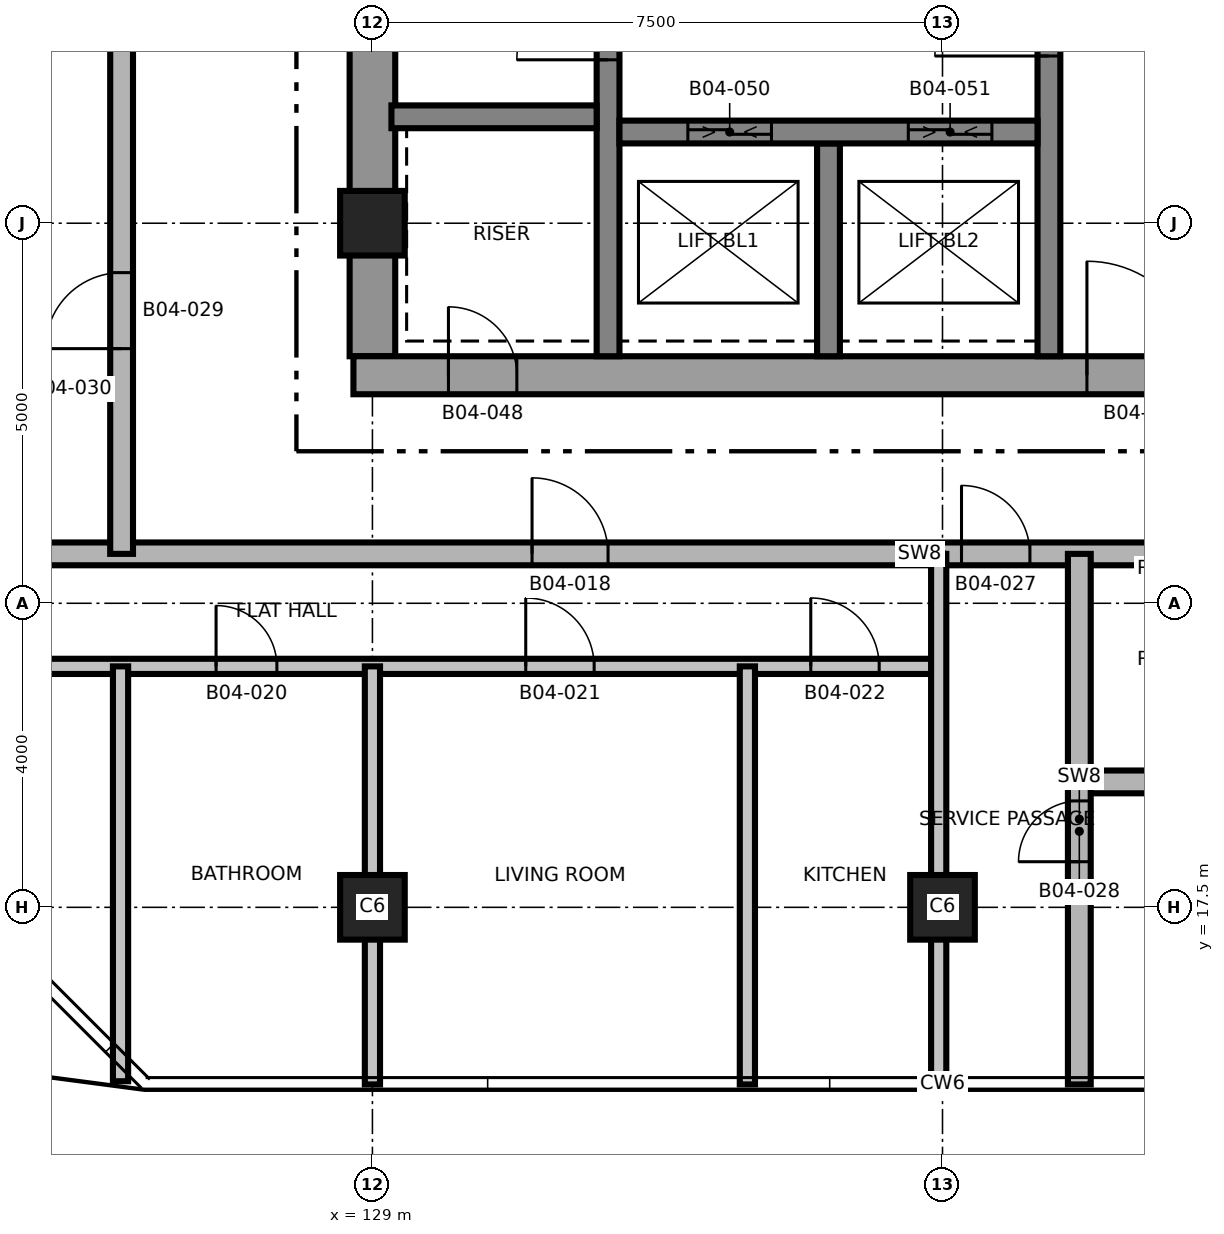
"""IFC4 building model, lengths in metres.
Left out: names, types, materials, properties, quantities, classifications, styles, units other than length and angle.
Written with IfcOpenShell. Run it as: python <this file> out.ifc"""

import sys

from ifc_helpers import new_model, si_unit, direction, frame, frame_2d, origin, origin_2d, place, context, subcontext, project, spatial, rectangle, extrude, element, fill, save


model = new_model("IFC4")
c1 = context("Model", 3, precision=1e-05, world=origin(), true_north=direction((0.0, 1.0)))
c2 = subcontext(c1, "Body", "Model", "MODEL_VIEW")
j1 = project(units=[si_unit("LENGTHUNIT", "METRE"), si_unit("PLANEANGLEUNIT", "RADIAN")], contexts=[c1])
p1 = place(None, origin())
s1 = spatial("IfcSite", under=j1, at=p1, CompositionType="ELEMENT")
p2 = place(p1, origin())
s2 = spatial("IfcBuilding", under=s1, at=p2, CompositionType="ELEMENT")
p3 = place(p2, frame((0.0, 0.0, 66.8)))
s3 = spatial("IfcBuildingStorey", under=s2, at=p3, CompositionType="ELEMENT", Elevation=66.8)
p4 = place(p3, frame((129.0, 24.75, 0.0), z_axis=(0.0, 0.0, 1.0), x_axis=(0.0, 1.0, 0.0)))
e1 = element("IfcWall", 1, at=p4, inside=s3, PredefinedType="SHEAR", context=c2, shape_type="SweptSolid", body=[
    extrude(rectangle(XDim=12.5, YDim=0.6, at=frame_2d((6.25, 0.0))), origin(), (0.0, 0.0, 1.0), 3.7),
])
p5 = place(p4, frame((5.15, 0.0, 0.0)))
e2 = element("IfcOpeningElement", 2, at=p5, cuts=e1, PredefinedType="OPENING", context=c2, shape_type="SweptSolid", body=[
    extrude(rectangle(XDim=1.0, YDim=2.1, at=frame_2d((0.5, 1.05))), frame((0.0, 0.31, 0.0), z_axis=(0.0, -1.0, 0.0), x_axis=(1.0, 0.0, 0.0)), (0.0, 0.0, 1.0), 0.62),
])
p6 = place(p3, frame((128.75, 24.5, 0.0), z_axis=(0.0, 0.0, 1.0), x_axis=(1.0, 0.0, 0.0)))
e3 = element("IfcWall", 3, at=p6, inside=s3, PredefinedType="SHEAR", context=c2, shape_type="SweptSolid", body=[
    extrude(rectangle(XDim=15.0, YDim=0.5, at=frame_2d((7.5, 0.0))), origin(), (0.0, 0.0, 1.0), 3.7),
])
p7 = place(p6, frame((9.65, 0.0, 0.0)))
e4 = element("IfcOpeningElement", 4, at=p7, cuts=e3, PredefinedType="OPENING", context=c2, shape_type="SweptSolid", body=[
    extrude(rectangle(XDim=1.5, YDim=2.1, at=frame_2d((0.75, 1.05))), frame((0.0, 0.26, 0.0), z_axis=(0.0, -1.0, 0.0), x_axis=(1.0, 0.0, 0.0)), (0.0, 0.0, 1.0), 0.52),
])
p8 = place(p6, frame((1.25, 0.0, 0.0)))
e5 = element("IfcOpeningElement", 5, at=p8, cuts=e3, PredefinedType="OPENING", context=c2, shape_type="SweptSolid", body=[
    extrude(rectangle(XDim=0.9, YDim=2.1, at=frame_2d((0.45, 1.05))), frame((0.0, 0.26, 0.0), z_axis=(0.0, -1.0, 0.0), x_axis=(1.0, 0.0, 0.0)), (0.0, 0.0, 1.0), 0.52),
])
p9 = place(p3, frame((132.1, 24.75, 0.0), z_axis=(0.0, 0.0, 1.0), x_axis=(0.0, 1.0, 0.0)))
e6 = element("IfcWall", 6, at=p9, inside=s3, PredefinedType="SHEAR", context=c2, shape_type="SweptSolid", body=[
    extrude(rectangle(XDim=12.5, YDim=0.3, at=frame_2d((6.25, 0.0))), origin(), (0.0, 0.0, 1.0), 3.7),
])
p10 = place(p9, frame((3.9, 0.0, 0.0)))
e7 = element("IfcOpeningElement", 7, at=p10, cuts=e6, PredefinedType="OPENING", context=c2, shape_type="SweptSolid", body=[
    extrude(rectangle(XDim=1.2, YDim=2.1, at=frame_2d((0.6, 1.05))), frame((0.0, 0.16, 0.0), z_axis=(0.0, -1.0, 0.0), x_axis=(1.0, 0.0, 0.0)), (0.0, 0.0, 1.0), 0.32),
])
p11 = place(p3, frame((137.9, 24.75, 0.0), z_axis=(0.0, 0.0, 1.0), x_axis=(0.0, 1.0, 0.0)))
e8 = element("IfcWall", 8, at=p11, inside=s3, PredefinedType="SHEAR", context=c2, shape_type="SweptSolid", body=[
    extrude(rectangle(XDim=12.5, YDim=0.3, at=frame_2d((6.25, 0.0))), origin(), (0.0, 0.0, 1.0), 3.7),
])
p12 = place(p11, frame((3.95, 0.0, 0.0)))
e9 = element("IfcOpeningElement", 9, at=p12, cuts=e8, PredefinedType="OPENING", context=c2, shape_type="SweptSolid", body=[
    extrude(rectangle(XDim=1.5, YDim=2.1, at=frame_2d((0.75, 1.05))), frame((0.0, 0.16, 0.0), z_axis=(0.0, -1.0, 0.0), x_axis=(1.0, 0.0, 0.0)), (0.0, 0.0, 1.0), 0.32),
])
p13 = place(p11, frame((10.45, 0.0, 0.0)))
e10 = element("IfcOpeningElement", 10, at=p13, cuts=e8, PredefinedType="OPENING", context=c2, shape_type="SweptSolid", body=[
    extrude(rectangle(XDim=0.9, YDim=2.1, at=frame_2d((0.45, 1.05))), frame((0.0, 0.16, 0.0), z_axis=(0.0, -1.0, 0.0), x_axis=(1.0, 0.0, 0.0)), (0.0, 0.0, 1.0), 0.32),
])
p14 = place(p3, frame((135.0, 24.75, 0.0), z_axis=(0.0, 0.0, 1.0), x_axis=(0.0, 1.0, 0.0)))
e11 = element("IfcWall", 11, at=p14, inside=s3, PredefinedType="SHEAR", context=c2, shape_type="SweptSolid", body=[
    extrude(rectangle(XDim=2.8, YDim=0.3, at=frame_2d((1.4, 0.0))), origin(), (0.0, 0.0, 1.0), 3.7),
])
p15 = place(p3, frame((132.25, 27.7, 0.0), z_axis=(0.0, 0.0, 1.0), x_axis=(1.0, 0.0, 0.0)))
e12 = element("IfcWall", 12, at=p15, inside=s3, PredefinedType="SHEAR", context=c2, shape_type="SweptSolid", body=[
    extrude(rectangle(XDim=5.5, YDim=0.3, at=frame_2d((2.75, 0.0))), origin(), (0.0, 0.0, 1.0), 3.7),
])
p16 = place(p15, frame((0.9, 0.0, 0.0)))
e13 = element("IfcOpeningElement", 13, at=p16, cuts=e12, PredefinedType="OPENING", context=c2, shape_type="SweptSolid", body=[
    extrude(rectangle(XDim=1.1, YDim=2.4, at=frame_2d((0.55, 1.2))), frame((0.0, 0.16, 0.0), z_axis=(0.0, -1.0, 0.0), x_axis=(1.0, 0.0, 0.0)), (0.0, 0.0, 1.0), 0.32),
])
p17 = place(p15, frame((3.8, 0.0, 0.0)))
e14 = element("IfcOpeningElement", 14, at=p17, cuts=e12, PredefinedType="OPENING", context=c2, shape_type="SweptSolid", body=[
    extrude(rectangle(XDim=1.1, YDim=2.4, at=frame_2d((0.55, 1.2))), frame((0.0, 0.16, 0.0), z_axis=(0.0, -1.0, 0.0), x_axis=(1.0, 0.0, 0.0)), (0.0, 0.0, 1.0), 0.32),
])
p18 = place(p3, frame((129.25, 27.9, 0.0), z_axis=(0.0, 0.0, 1.0), x_axis=(1.0, 0.0, 0.0)))
e15 = element("IfcWall", 15, at=p18, inside=s3, PredefinedType="SHEAR", context=c2, shape_type="SweptSolid", body=[
    extrude(rectangle(XDim=2.7, YDim=0.3, at=frame_2d((1.35, 0.0))), origin(), (0.0, 0.0, 1.0), 3.7),
])
for number, where, z_axis, x_axis in (
    (16, (129.0, 17.5, 0.0), (0.0, 0.0, 1.0), (1.0, 0.0, 0.0)),
    (17, (136.5, 17.5, 0.0), (0.0, 0.0, 1.0), (1.0, 0.0, 0.0)),
    (18, (129.0, 26.5, 0.0), (0.0, 0.0, 1.0), (1.0, 0.0, 0.0)),
):
    element("IfcColumn", number, at=place(p3, frame(where, z_axis=z_axis, x_axis=x_axis)), inside=s3, PredefinedType="COLUMN", context=c2, shape_type="SweptSolid", body=[
        extrude(rectangle(XDim=0.85, YDim=0.85, at=origin_2d()), origin(), (0.0, 0.0, 1.0), 3.7),
    ])
p19 = place(p3, frame((138.25, 19.15, 0.0), z_axis=(0.0, 0.0, 1.0), x_axis=(1.0, 0.0, 0.0)))
e19 = element("IfcWall", 19, at=p19, inside=s3, PredefinedType="SHEAR", context=c2, shape_type="SweptSolid", body=[
    extrude(rectangle(XDim=5.75, YDim=0.3, at=frame_2d((2.875, 0.0))), origin(), (0.0, 0.0, 1.0), 3.4),
])
p20 = place(p3, frame((119.346, 20.67, 0.0), z_axis=(0.0, 0.0, 1.0), x_axis=(1.0, 0.0, 0.0)))
e20 = element("IfcWall", 20, at=p20, inside=s3, PredefinedType="PARTITIONING", context=c2, shape_type="SweptSolid", body=[
    extrude(rectangle(XDim=17.154, YDim=0.2, at=frame_2d((8.577, 0.0))), origin(), (0.0, 0.0, 1.0), 3.4),
])
p21 = place(p20, frame((3.717, 0.0, 0.0)))
e21 = element("IfcOpeningElement", 21, at=p21, cuts=e20, PredefinedType="OPENING", context=c2, shape_type="SweptSolid", body=[
    extrude(rectangle(XDim=0.9, YDim=2.1, at=frame_2d((0.45, 1.05))), frame((0.0, 0.11, 0.0), z_axis=(0.0, -1.0, 0.0), x_axis=(1.0, 0.0, 0.0)), (0.0, 0.0, 1.0), 0.22),
])
p22 = place(p20, frame((7.597, 0.0, 0.0)))
e22 = element("IfcOpeningElement", 22, at=p22, cuts=e20, PredefinedType="OPENING", context=c2, shape_type="SweptSolid", body=[
    extrude(rectangle(XDim=0.8, YDim=2.1, at=frame_2d((0.4, 1.05))), frame((0.0, 0.11, 0.0), z_axis=(0.0, -1.0, 0.0), x_axis=(1.0, 0.0, 0.0)), (0.0, 0.0, 1.0), 0.22),
])
p23 = place(p20, frame((11.671, 0.0, 0.0)))
e23 = element("IfcOpeningElement", 23, at=p23, cuts=e20, PredefinedType="OPENING", context=c2, shape_type="SweptSolid", body=[
    extrude(rectangle(XDim=0.9, YDim=2.1, at=frame_2d((0.45, 1.05))), frame((0.0, 0.11, 0.0), z_axis=(0.0, -1.0, 0.0), x_axis=(1.0, 0.0, 0.0)), (0.0, 0.0, 1.0), 0.22),
])
p24 = place(p20, frame((15.421, 0.0, 0.0)))
e24 = element("IfcOpeningElement", 24, at=p24, cuts=e20, PredefinedType="OPENING", context=c2, shape_type="SweptSolid", body=[
    extrude(rectangle(XDim=0.9, YDim=2.1, at=frame_2d((0.45, 1.05))), frame((0.0, 0.11, 0.0), z_axis=(0.0, -1.0, 0.0), x_axis=(1.0, 0.0, 0.0)), (0.0, 0.0, 1.0), 0.22),
])
p25 = place(p3, frame((119.17, 22.15, 0.0), z_axis=(0.0, 0.0, 1.0), x_axis=(1.0, 0.0, 0.0)))
e25 = element("IfcWall", 25, at=p25, inside=s3, PredefinedType="SHEAR", context=c2, shape_type="SweptSolid", body=[
    extrude(rectangle(XDim=34.66, YDim=0.3, at=frame_2d((17.33, 0.0))), origin(), (0.0, 0.0, 1.0), 3.4),
])
p26 = place(p25, frame((23.58, 0.0, 0.0)))
e26 = element("IfcOpeningElement", 26, at=p26, cuts=e25, PredefinedType="OPENING", context=c2, shape_type="SweptSolid", body=[
    extrude(rectangle(XDim=1.0, YDim=2.1, at=frame_2d((0.5, 1.05))), frame((0.0, 0.16, 0.0), z_axis=(0.0, -1.0, 0.0), x_axis=(1.0, 0.0, 0.0)), (0.0, 0.0, 1.0), 0.32),
])
p27 = place(p25, frame((11.93, 0.0, 0.0)))
e27 = element("IfcOpeningElement", 27, at=p27, cuts=e25, PredefinedType="OPENING", context=c2, shape_type="SweptSolid", body=[
    extrude(rectangle(XDim=1.0, YDim=2.1, at=frame_2d((0.5, 1.05))), frame((0.0, 0.16, 0.0), z_axis=(0.0, -1.0, 0.0), x_axis=(1.0, 0.0, 0.0)), (0.0, 0.0, 1.0), 0.32),
])
p28 = place(p25, frame((25.48, 0.0, 0.0)))
e28 = element("IfcOpeningElement", 28, at=p28, cuts=e25, PredefinedType="OPENING", context=c2, shape_type="SweptSolid", body=[
    extrude(rectangle(XDim=1.0, YDim=2.1, at=frame_2d((0.5, 1.05))), frame((0.0, 0.16, 0.0), z_axis=(0.0, -1.0, 0.0), x_axis=(1.0, 0.0, 0.0)), (0.0, 0.0, 1.0), 0.32),
])
p29 = place(p25, frame((17.58, 0.0, 0.0)))
e29 = element("IfcOpeningElement", 29, at=p29, cuts=e25, PredefinedType="OPENING", context=c2, shape_type="SweptSolid", body=[
    extrude(rectangle(XDim=0.9, YDim=2.1, at=frame_2d((0.45, 1.05))), frame((0.0, 0.16, 0.0), z_axis=(0.0, -1.0, 0.0), x_axis=(1.0, 0.0, 0.0)), (0.0, 0.0, 1.0), 0.32),
])
p30 = place(p3, frame((125.686, 15.212, 0.0), z_axis=(0.0, 0.0, 1.0), x_axis=(0.0, 1.0, 0.0)))
e30 = element("IfcWall", 30, at=p30, inside=s3, PredefinedType="PARTITIONING", context=c2, shape_type="SweptSolid", body=[
    extrude(rectangle(XDim=5.458, YDim=0.2, at=frame_2d((2.729, 0.0))), origin(), (0.0, 0.0, 1.0), 3.4),
])
p31 = place(p3, frame((125.7, 22.15, 0.0), z_axis=(0.0, 0.0, 1.0), x_axis=(0.0, 1.0, 0.0)))
e31 = element("IfcWall", 31, at=p31, inside=s3, PredefinedType="SHEAR", context=c2, shape_type="SweptSolid", body=[
    extrude(rectangle(XDim=17.7, YDim=0.3, at=frame_2d((8.85, 0.0))), origin(), (0.0, 0.0, 1.0), 3.4),
])
p32 = place(p31, frame((2.7, 0.0, 0.0)))
e32 = element("IfcOpeningElement", 32, at=p32, cuts=e31, PredefinedType="OPENING", context=c2, shape_type="SweptSolid", body=[
    extrude(rectangle(XDim=1.0, YDim=2.1, at=frame_2d((0.5, 1.05))), frame((0.0, 0.16, 0.0), z_axis=(0.0, -1.0, 0.0), x_axis=(1.0, 0.0, 0.0)), (0.0, 0.0, 1.0), 0.32),
])
for number, where, z_axis, x_axis in (
    (33, (129.0, 15.17, 0.0), (0.0, 0.0, 1.0), (0.0, 1.0, 0.0)),
    (34, (133.933, 15.17, 0.0), (0.0, 0.0, 1.0), (0.0, 1.0, 0.0)),
):
    element("IfcWall", number, at=place(p3, frame(where, z_axis=z_axis, x_axis=x_axis)), inside=s3, PredefinedType="PARTITIONING", context=c2, shape_type="SweptSolid", body=[
        extrude(rectangle(XDim=5.5, YDim=0.2, at=frame_2d((2.75, 0.0))), origin(), (0.0, 0.0, 1.0), 3.4),
    ])
p33 = place(p3, frame((136.45, 15.17, 0.0), z_axis=(0.0, 0.0, 1.0), x_axis=(0.0, 1.0, 0.0)))
e35 = element("IfcWall", 35, at=p33, inside=s3, PredefinedType="PARTITIONING", context=c2, shape_type="SweptSolid", body=[
    extrude(rectangle(XDim=6.98, YDim=0.2, at=frame_2d((3.49, 0.0))), origin(), (0.0, 0.0, 1.0), 3.4),
])
p34 = place(p3, frame((138.3, 15.17, 0.0), z_axis=(0.0, 0.0, 1.0), x_axis=(0.0, 1.0, 0.0)))
e36 = element("IfcWall", 36, at=p34, inside=s3, PredefinedType="SHEAR", context=c2, shape_type="SweptSolid", body=[
    extrude(rectangle(XDim=6.98, YDim=0.3, at=frame_2d((3.49, 0.0))), origin(), (0.0, 0.0, 1.0), 3.4),
])
p35 = place(p34, frame((2.93, 0.0, 0.0)))
e37 = element("IfcOpeningElement", 37, at=p35, cuts=e36, PredefinedType="OPENING", context=c2, shape_type="SweptSolid", body=[
    extrude(rectangle(XDim=0.8, YDim=2.1, at=frame_2d((0.4, 1.05))), frame((0.0, 0.16, 0.0), z_axis=(0.0, -1.0, 0.0), x_axis=(1.0, 0.0, 0.0)), (0.0, 0.0, 1.0), 0.32),
])
p36 = place(p27, origin())
e38 = element("IfcDoor", 38, at=p36, inside=s3, OperationType="SINGLE_SWING_RIGHT", PredefinedType="DOOR", context=c2, shape_type="SweptSolid", body=[
    extrude(rectangle(XDim=1.0, YDim=2.1, at=frame_2d((0.5, 1.05))), frame((0.0, 0.025, 0.0), z_axis=(0.0, -1.0, 0.0), x_axis=(1.0, 0.0, 0.0)), (0.0, 0.0, 1.0), 0.05),
])
fill(e27, e38)
p37 = place(p22, origin())
e39 = element("IfcDoor", 39, at=p37, inside=s3, OperationType="SINGLE_SWING_RIGHT", PredefinedType="DOOR", context=c2, shape_type="SweptSolid", body=[
    extrude(rectangle(XDim=0.8, YDim=2.1, at=frame_2d((0.4, 1.05))), frame((0.0, 0.025, 0.0), z_axis=(0.0, -1.0, 0.0), x_axis=(1.0, 0.0, 0.0)), (0.0, 0.0, 1.0), 0.05),
])
fill(e22, e39)
p38 = place(p23, origin())
e40 = element("IfcDoor", 40, at=p38, inside=s3, OperationType="SINGLE_SWING_LEFT", PredefinedType="DOOR", context=c2, shape_type="SweptSolid", body=[
    extrude(rectangle(XDim=0.9, YDim=2.1, at=frame_2d((0.45, 1.05))), frame((0.0, 0.025, 0.0), z_axis=(0.0, -1.0, 0.0), x_axis=(1.0, 0.0, 0.0)), (0.0, 0.0, 1.0), 0.05),
])
fill(e23, e40)
p39 = place(p24, origin())
e41 = element("IfcDoor", 41, at=p39, inside=s3, OperationType="SINGLE_SWING_RIGHT", PredefinedType="DOOR", context=c2, shape_type="SweptSolid", body=[
    extrude(rectangle(XDim=0.9, YDim=2.1, at=frame_2d((0.45, 1.05))), frame((0.0, 0.025, 0.0), z_axis=(0.0, -1.0, 0.0), x_axis=(1.0, 0.0, 0.0)), (0.0, 0.0, 1.0), 0.05),
])
fill(e24, e41)
p40 = place(p29, origin())
e42 = element("IfcDoor", 42, at=p40, inside=s3, OperationType="SINGLE_SWING_LEFT", PredefinedType="DOOR", context=c2, shape_type="SweptSolid", body=[
    extrude(rectangle(XDim=0.9, YDim=2.1, at=frame_2d((0.45, 1.05))), frame((0.0, 0.025, 0.0), z_axis=(0.0, -1.0, 0.0), x_axis=(1.0, 0.0, 0.0)), (0.0, 0.0, 1.0), 0.05),
])
fill(e29, e42)
p41 = place(p35, origin())
e43 = element("IfcDoor", 43, at=p41, inside=s3, OperationType="SINGLE_SWING_RIGHT", PredefinedType="DOOR", context=c2, shape_type="SweptSolid", body=[
    extrude(rectangle(XDim=0.8, YDim=2.1, at=frame_2d((0.4, 1.05))), frame((0.0, 0.025, 0.0), z_axis=(0.0, -1.0, 0.0), x_axis=(1.0, 0.0, 0.0)), (0.0, 0.0, 1.0), 0.05),
])
fill(e37, e43)
p42 = place(p32, origin())
e44 = element("IfcDoor", 44, at=p42, inside=s3, OperationType="SINGLE_SWING_LEFT", PredefinedType="DOOR", context=c2, shape_type="SweptSolid", body=[
    extrude(rectangle(XDim=1.0, YDim=2.1, at=frame_2d((0.5, 1.05))), frame((0.0, 0.025, 0.0), z_axis=(0.0, -1.0, 0.0), x_axis=(1.0, 0.0, 0.0)), (0.0, 0.0, 1.0), 0.05),
])
fill(e32, e44)
p43 = place(p12, origin())
e45 = element("IfcDoor", 45, at=p43, inside=s3, OperationType="SINGLE_SWING_RIGHT", PredefinedType="DOOR", context=c2, shape_type="SweptSolid", body=[
    extrude(rectangle(XDim=1.5, YDim=2.1, at=frame_2d((0.75, 1.05))), frame((0.0, 0.025, 0.0), z_axis=(0.0, -1.0, 0.0), x_axis=(1.0, 0.0, 0.0)), (0.0, 0.0, 1.0), 0.05),
])
fill(e9, e45)
p44 = place(p10, origin())
e46 = element("IfcDoor", 46, at=p44, inside=s3, OperationType="SINGLE_SWING_LEFT", PredefinedType="DOOR", context=c2, shape_type="SweptSolid", body=[
    extrude(rectangle(XDim=1.2, YDim=2.1, at=frame_2d((0.6, 1.05))), frame((0.0, 0.025, 0.0), z_axis=(0.0, -1.0, 0.0), x_axis=(1.0, 0.0, 0.0)), (0.0, 0.0, 1.0), 0.05),
])
fill(e7, e46)
p45 = place(p7, origin())
e47 = element("IfcDoor", 47, at=p45, inside=s3, OperationType="SINGLE_SWING_LEFT", PredefinedType="DOOR", context=c2, shape_type="SweptSolid", body=[
    extrude(rectangle(XDim=1.5, YDim=2.1, at=frame_2d((0.75, 1.05))), frame((0.0, 0.025, 0.0), z_axis=(0.0, -1.0, 0.0), x_axis=(1.0, 0.0, 0.0)), (0.0, 0.0, 1.0), 0.05),
])
fill(e4, e47)
p46 = place(p8, origin())
e48 = element("IfcDoor", 48, at=p46, inside=s3, OperationType="SINGLE_SWING_LEFT", PredefinedType="DOOR", context=c2, shape_type="SweptSolid", body=[
    extrude(rectangle(XDim=0.9, YDim=2.1, at=frame_2d((0.45, 1.05))), frame((0.0, 0.025, 0.0), z_axis=(0.0, -1.0, 0.0), x_axis=(1.0, 0.0, 0.0)), (0.0, 0.0, 1.0), 0.05),
])
fill(e5, e48)
p47 = place(p16, origin())
e49 = element("IfcDoor", 49, at=p47, inside=s3, OperationType="SLIDING_TO_LEFT", PredefinedType="DOOR", context=c2, shape_type="SweptSolid", body=[
    extrude(rectangle(XDim=1.1, YDim=2.4, at=frame_2d((0.55, 1.2))), frame((0.0, 0.025, 0.0), z_axis=(0.0, -1.0, 0.0), x_axis=(1.0, 0.0, 0.0)), (0.0, 0.0, 1.0), 0.05),
])
fill(e13, e49)
p48 = place(p17, origin())
e50 = element("IfcDoor", 50, at=p48, inside=s3, OperationType="SLIDING_TO_LEFT", PredefinedType="DOOR", context=c2, shape_type="SweptSolid", body=[
    extrude(rectangle(XDim=1.1, YDim=2.4, at=frame_2d((0.55, 1.2))), frame((0.0, 0.025, 0.0), z_axis=(0.0, -1.0, 0.0), x_axis=(1.0, 0.0, 0.0)), (0.0, 0.0, 1.0), 0.05),
])
fill(e14, e50)
save(model, sys.argv[1])
